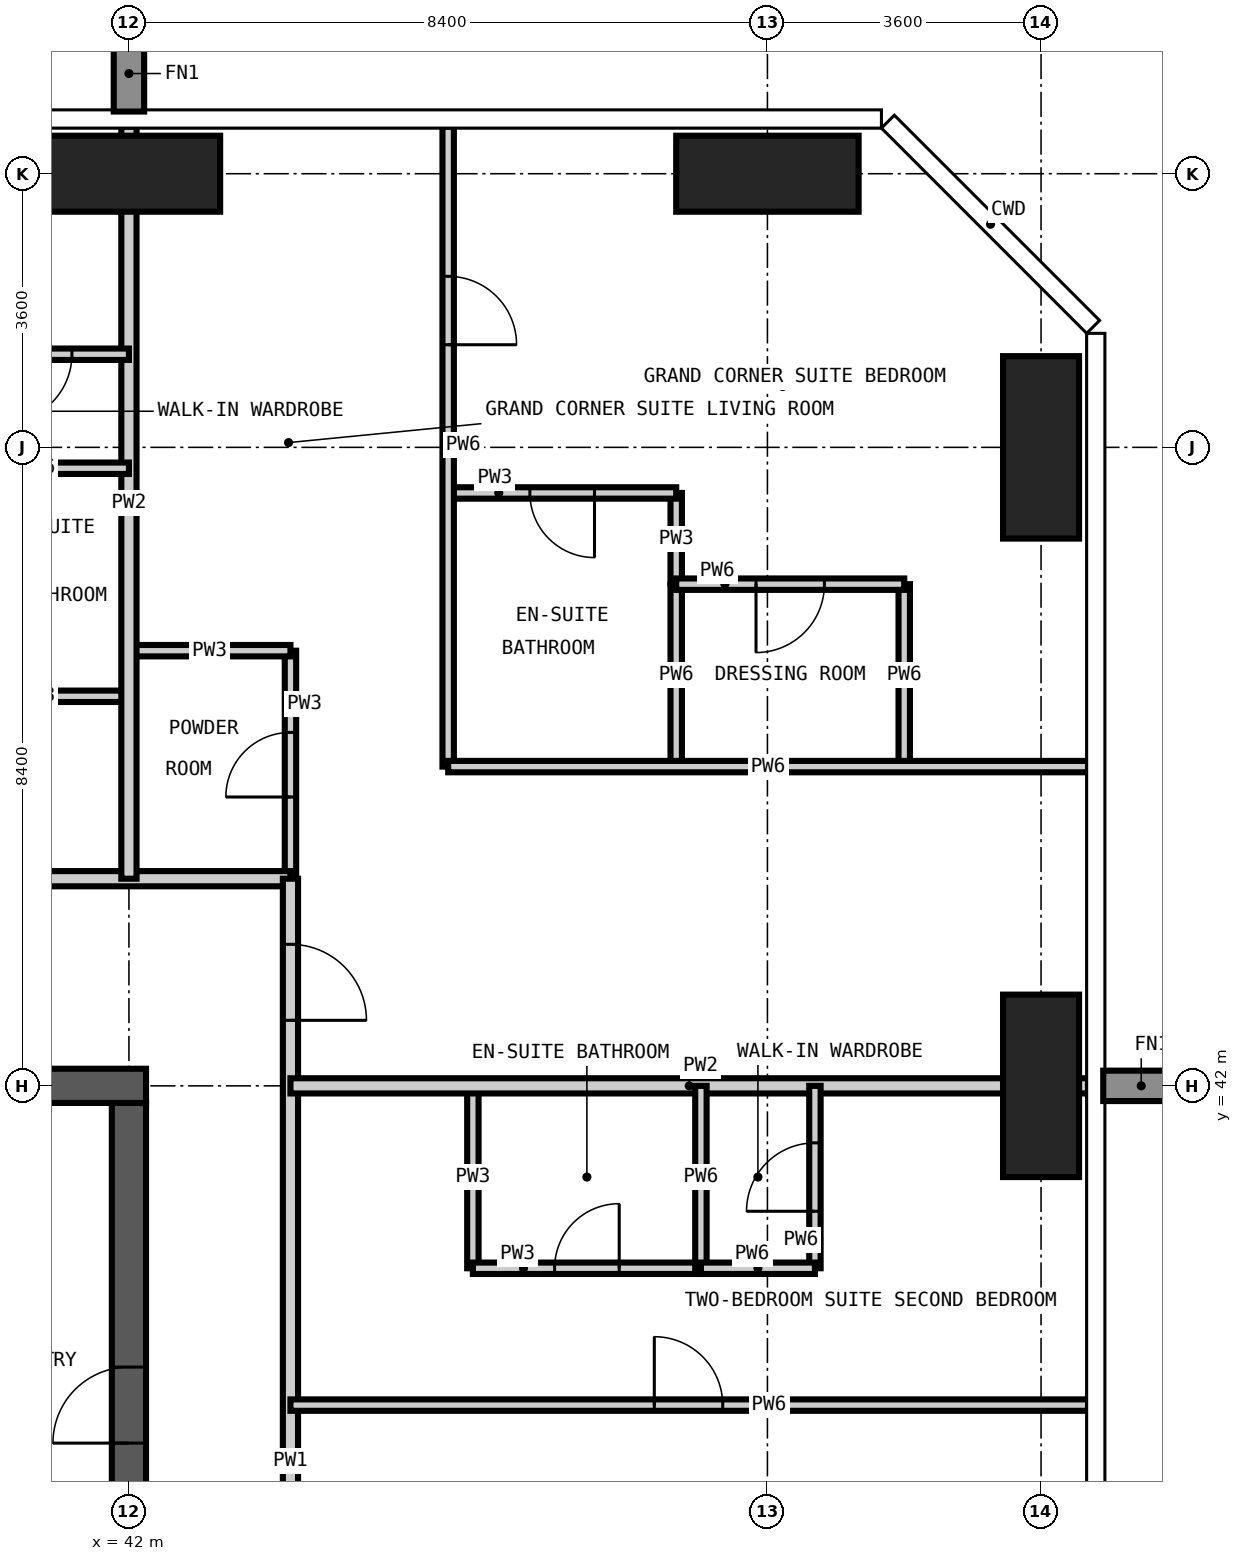
"""IFC4 building model, lengths in metres.
Left out: names, types, materials, properties, quantities, classifications, styles, units other than length and angle.
Written with IfcOpenShell. Run it as: python <this file> out.ifc"""

import sys

from ifc_helpers import new_model, si_unit, direction, frame, frame_2d, origin, origin_2d, place, context, subcontext, project, spatial, rectangle, extrude, element, fill, save


model = new_model("IFC4")
c1 = context("Model", 3, precision=1e-05, world=origin(), true_north=direction((0.0, 1.0)))
c2 = subcontext(c1, "Body", "Model", "MODEL_VIEW")
j1 = project(units=[si_unit("LENGTHUNIT", "METRE"), si_unit("PLANEANGLEUNIT", "RADIAN")], contexts=[c1])
p1 = place(None, origin())
s1 = spatial("IfcSite", under=j1, at=p1, CompositionType="ELEMENT")
p2 = place(p1, origin())
s2 = spatial("IfcBuilding", under=s1, at=p2, CompositionType="ELEMENT")
p3 = place(p2, frame((0.0, 0.0, 276.3)))
s3 = spatial("IfcBuildingStorey", under=s2, at=p3, CompositionType="ELEMENT", Elevation=276.3)
for number, where, z_axis, x_axis in (
    (1, (42.0, 54.0, -0.35), (0.0, 0.0, 1.0), (1.0, 0.0, 0.0)),
    (2, (50.4, 54.0, -0.35), (0.0, 0.0, 1.0), (1.0, 0.0, 0.0)),
):
    element("IfcColumn", number, at=place(p3, frame(where, z_axis=z_axis, x_axis=x_axis)), inside=s3, PredefinedType="COLUMN", context=c2, shape_type="SweptSolid", body=[
        extrude(rectangle(XDim=2.4, YDim=1.0, at=origin_2d()), origin(), (0.0, 0.0, 1.0), 3.9),
    ])
for number, where, z_axis, x_axis in (
    (3, (54.0, 42.0, -0.35), (0.0, 0.0, 1.0), (1.0, 0.0, 0.0)),
    (4, (54.0, 50.4, -0.35), (0.0, 0.0, 1.0), (1.0, 0.0, 0.0)),
):
    element("IfcColumn", number, at=place(p3, frame(where, z_axis=z_axis, x_axis=x_axis)), inside=s3, PredefinedType="COLUMN", context=c2, shape_type="SweptSolid", body=[
        extrude(rectangle(XDim=1.0, YDim=2.4, at=origin_2d()), origin(), (0.0, 0.0, 1.0), 3.9),
    ])
p4 = place(p3, frame((42.0, 17.025, -0.35), z_axis=(0.0, 0.0, 1.0), x_axis=(0.0, 1.0, 0.0)))
e5 = element("IfcWall", 5, at=p4, inside=s3, PredefinedType="SHEAR", context=c2, shape_type="SweptSolid", body=[
    extrude(rectangle(XDim=24.75, YDim=0.45, at=frame_2d((12.375, 0.0))), origin(), (0.0, 0.0, 1.0), 3.9),
])
p5 = place(p4, frame((0.575, 0.0, 0.35)))
e6 = element("IfcOpeningElement", 6, at=p5, cuts=e5, PredefinedType="OPENING", context=c2, shape_type="SweptSolid", body=[
    extrude(rectangle(XDim=1.2, YDim=2.2, at=frame_2d((0.6, 1.1))), frame((0.0, 0.235, 0.0), z_axis=(0.0, -1.0, 0.0), x_axis=(1.0, 0.0, 0.0)), (0.0, 0.0, 1.0), 0.47),
])
p6 = place(p4, frame((11.475, 0.0, 0.35)))
e7 = element("IfcOpeningElement", 7, at=p6, cuts=e5, PredefinedType="OPENING", context=c2, shape_type="SweptSolid", body=[
    extrude(rectangle(XDim=1.8, YDim=2.2, at=frame_2d((0.9, 1.1))), frame((0.0, 0.235, 0.0), z_axis=(0.0, -1.0, 0.0), x_axis=(1.0, 0.0, 0.0)), (0.0, 0.0, 1.0), 0.47),
])
p7 = place(p4, frame((20.275, 0.0, 0.35)))
e8 = element("IfcOpeningElement", 8, at=p7, cuts=e5, PredefinedType="OPENING", context=c2, shape_type="SweptSolid", body=[
    extrude(rectangle(XDim=1.0, YDim=2.1, at=frame_2d((0.5, 1.05))), frame((0.0, 0.235, 0.0), z_axis=(0.0, -1.0, 0.0), x_axis=(1.0, 0.0, 0.0)), (0.0, 0.0, 1.0), 0.47),
])
p8 = place(p3, frame((42.225, 42.0, -0.35), z_axis=(0.0, 0.0, 1.0), x_axis=(-1.0, 0.0, 0.0)))
e9 = element("IfcWall", 9, at=p8, inside=s3, PredefinedType="SHEAR", context=c2, shape_type="SweptSolid", body=[
    extrude(rectangle(XDim=17.25, YDim=0.45, at=frame_2d((8.625, 0.0))), origin(), (0.0, 0.0, 1.0), 3.9),
])
p9 = place(p8, frame((10.125, 0.0, 0.35)))
e10 = element("IfcOpeningElement", 10, at=p9, cuts=e9, PredefinedType="OPENING", context=c2, shape_type="SweptSolid", body=[
    extrude(rectangle(XDim=1.2, YDim=2.2, at=frame_2d((0.6, 1.1))), frame((0.0, 0.235, 0.0), z_axis=(0.0, -1.0, 0.0), x_axis=(1.0, 0.0, 0.0)), (0.0, 0.0, 1.0), 0.47),
])
p10 = place(p3, frame((44.125, 44.725, 0.0), z_axis=(0.0, 0.0, 1.0), x_axis=(0.0, 1.0, 0.0)))
e11 = element("IfcWall", 11, at=p10, inside=s3, PredefinedType="PARTITIONING", context=c2, shape_type="SweptSolid", body=[
    extrude(rectangle(XDim=3.0, YDim=0.15, at=frame_2d((1.5, 0.0))), origin(), (0.0, 0.0, 1.0), 3.55),
])
p11 = place(p10, frame((1.075, 0.0, 0.0)))
e12 = element("IfcOpeningElement", 12, at=p11, cuts=e11, PredefinedType="OPENING", context=c2, shape_type="SweptSolid", body=[
    extrude(rectangle(XDim=0.85, YDim=2.1, at=frame_2d((0.425, 1.05))), frame((0.0, 0.085, 0.0), z_axis=(0.0, -1.0, 0.0), x_axis=(1.0, 0.0, 0.0)), (0.0, 0.0, 1.0), 0.17),
])
p12 = place(p3, frame((46.525, 39.6, 0.0), z_axis=(0.0, 0.0, 1.0), x_axis=(0.0, 1.0, 0.0)))
e13 = element("IfcWall", 13, at=p12, inside=s3, PredefinedType="PARTITIONING", context=c2, shape_type="SweptSolid", body=[
    extrude(rectangle(XDim=2.4, YDim=0.15, at=frame_2d((1.2, 0.0))), origin(), (0.0, 0.0, 1.0), 3.55),
])
p13 = place(p3, frame((49.2, 48.6, 0.0), z_axis=(0.0, 0.0, 1.0), x_axis=(0.0, 1.0, 0.0)))
e14 = element("IfcWall", 14, at=p13, inside=s3, PredefinedType="PARTITIONING", context=c2, shape_type="SweptSolid", body=[
    extrude(rectangle(XDim=1.2, YDim=0.15, at=frame_2d((0.6, 0.0))), origin(), (0.0, 0.0, 1.0), 3.55),
])
p14 = place(p3, frame((46.525, 39.6, 0.0), z_axis=(0.0, 0.0, 1.0), x_axis=(1.0, 0.0, 0.0)))
e15 = element("IfcWall", 15, at=p14, inside=s3, PredefinedType="PARTITIONING", context=c2, shape_type="SweptSolid", body=[
    extrude(rectangle(XDim=3.0, YDim=0.15, at=frame_2d((1.5, 0.0))), origin(), (0.0, 0.0, 1.0), 3.55),
])
p15 = place(p14, frame((1.075, 0.0, 0.0)))
e16 = element("IfcOpeningElement", 16, at=p15, cuts=e15, PredefinedType="OPENING", context=c2, shape_type="SweptSolid", body=[
    extrude(rectangle(XDim=0.85, YDim=2.1, at=frame_2d((0.425, 1.05))), frame((0.0, 0.085, 0.0), z_axis=(0.0, -1.0, 0.0), x_axis=(1.0, 0.0, 0.0)), (0.0, 0.0, 1.0), 0.17),
])
p16 = place(p3, frame((39.6, 47.125, 0.0), z_axis=(0.0, 0.0, 1.0), x_axis=(1.0, 0.0, 0.0)))
e17 = element("IfcWall", 17, at=p16, inside=s3, PredefinedType="PARTITIONING", context=c2, shape_type="SweptSolid", body=[
    extrude(rectangle(XDim=2.4, YDim=0.15, at=frame_2d((1.2, 0.0))), origin(), (0.0, 0.0, 1.0), 3.55),
])
p17 = place(p3, frame((42.0, 47.725, 0.0), z_axis=(0.0, 0.0, 1.0), x_axis=(1.0, 0.0, 0.0)))
e18 = element("IfcWall", 18, at=p17, inside=s3, PredefinedType="PARTITIONING", context=c2, shape_type="SweptSolid", body=[
    extrude(rectangle(XDim=2.125, YDim=0.15, at=frame_2d((1.062, 0.0))), origin(), (0.0, 0.0, 1.0), 3.55),
])
p18 = place(p3, frame((46.2, 49.8, 0.0), z_axis=(0.0, 0.0, 1.0), x_axis=(1.0, 0.0, 0.0)))
e19 = element("IfcWall", 19, at=p18, inside=s3, PredefinedType="PARTITIONING", context=c2, shape_type="SweptSolid", body=[
    extrude(rectangle(XDim=3.0, YDim=0.15, at=frame_2d((1.5, 0.0))), origin(), (0.0, 0.0, 1.0), 3.55),
])
p19 = place(p18, frame((1.075, 0.0, 0.0)))
e20 = element("IfcOpeningElement", 20, at=p19, cuts=e19, PredefinedType="OPENING", context=c2, shape_type="SweptSolid", body=[
    extrude(rectangle(XDim=0.85, YDim=2.1, at=frame_2d((0.425, 1.05))), frame((0.0, 0.085, 0.0), z_axis=(0.0, -1.0, 0.0), x_axis=(1.0, 0.0, 0.0)), (0.0, 0.0, 1.0), 0.17),
])
p20 = place(p3, frame((21.875, 44.725, 0.0), z_axis=(0.0, 0.0, 1.0), x_axis=(1.0, 0.0, 0.0)))
e21 = element("IfcWall", 21, at=p20, inside=s3, PredefinedType="PARTITIONING", context=c2, shape_type="SweptSolid", body=[
    extrude(rectangle(XDim=22.25, YDim=0.2, at=frame_2d((11.125, 0.0))), origin(), (0.0, 0.0, 1.0), 3.55),
])
p21 = place(p20, frame((10.025, 0.0, 0.0)))
e22 = element("IfcOpeningElement", 22, at=p21, cuts=e21, PredefinedType="OPENING", context=c2, shape_type="SweptSolid", body=[
    extrude(rectangle(XDim=1.0, YDim=2.2, at=frame_2d((0.5, 1.1))), frame((0.0, 0.11, 0.0), z_axis=(0.0, -1.0, 0.0), x_axis=(1.0, 0.0, 0.0)), (0.0, 0.0, 1.0), 0.22),
])
p22 = place(p3, frame((44.125, 44.725, 0.0), z_axis=(0.0, 0.0, 1.0), x_axis=(0.0, -1.0, 0.0)))
e23 = element("IfcWall", 23, at=p22, inside=s3, PredefinedType="PARTITIONING", context=c2, shape_type="SweptSolid", body=[
    extrude(rectangle(XDim=15.325, YDim=0.2, at=frame_2d((7.663, 0.0))), origin(), (0.0, 0.0, 1.0), 3.55),
])
p23 = place(p22, frame((8.525, 0.0, 0.0)))
e24 = element("IfcOpeningElement", 24, at=p23, cuts=e23, PredefinedType="OPENING", context=c2, shape_type="SweptSolid", body=[
    extrude(rectangle(XDim=1.0, YDim=2.2, at=frame_2d((0.5, 1.1))), frame((0.0, 0.11, 0.0), z_axis=(0.0, -1.0, 0.0), x_axis=(1.0, 0.0, 0.0)), (0.0, 0.0, 1.0), 0.22),
])
p24 = place(p22, frame((0.863, 0.0, 0.0)))
e25 = element("IfcOpeningElement", 25, at=p24, cuts=e23, PredefinedType="OPENING", context=c2, shape_type="SweptSolid", body=[
    extrude(rectangle(XDim=1.0, YDim=2.2, at=frame_2d((0.5, 1.1))), frame((0.0, 0.11, 0.0), z_axis=(0.0, -1.0, 0.0), x_axis=(1.0, 0.0, 0.0)), (0.0, 0.0, 1.0), 0.22),
])
p25 = place(p3, frame((42.0, 44.725, 0.0), z_axis=(0.0, 0.0, 1.0), x_axis=(0.0, 1.0, 0.0)))
e26 = element("IfcWall", 26, at=p25, inside=s3, PredefinedType="PARTITIONING", context=c2, shape_type="SweptSolid", body=[
    extrude(rectangle(XDim=9.893, YDim=0.2, at=frame_2d((4.946, 0.0))), origin(), (0.0, 0.0, 1.0), 3.55),
])
p26 = place(p3, frame((44.125, 42.0, 0.0), z_axis=(0.0, 0.0, 1.0), x_axis=(1.0, 0.0, 0.0)))
e27 = element("IfcWall", 27, at=p26, inside=s3, PredefinedType="PARTITIONING", context=c2, shape_type="SweptSolid", body=[
    extrude(rectangle(XDim=10.493, YDim=0.2, at=frame_2d((5.247, 0.0))), origin(), (0.0, 0.0, 1.0), 3.55),
])
p27 = place(p3, frame((46.2, 46.2, 0.0), z_axis=(0.0, 0.0, 1.0), x_axis=(0.0, 1.0, 0.0)))
e28 = element("IfcWall", 28, at=p27, inside=s3, PredefinedType="PARTITIONING", context=c2, shape_type="SweptSolid", body=[
    extrude(rectangle(XDim=8.418, YDim=0.15, at=frame_2d((4.209, 0.0))), origin(), (0.0, 0.0, 1.0), 3.55),
])
p28 = place(p27, frame((5.55, 0.0, 0.0)))
e29 = element("IfcOpeningElement", 29, at=p28, cuts=e28, PredefinedType="OPENING", context=c2, shape_type="SweptSolid", body=[
    extrude(rectangle(XDim=0.9, YDim=2.1, at=frame_2d((0.45, 1.05))), frame((0.0, 0.085, 0.0), z_axis=(0.0, -1.0, 0.0), x_axis=(1.0, 0.0, 0.0)), (0.0, 0.0, 1.0), 0.17),
])
p29 = place(p3, frame((49.2, 46.2, 0.0), z_axis=(0.0, 0.0, 1.0), x_axis=(0.0, 1.0, 0.0)))
e30 = element("IfcWall", 30, at=p29, inside=s3, PredefinedType="PARTITIONING", context=c2, shape_type="SweptSolid", body=[
    extrude(rectangle(XDim=2.4, YDim=0.15, at=frame_2d((1.2, 0.0))), origin(), (0.0, 0.0, 1.0), 3.55),
])
p30 = place(p3, frame((49.525, 39.6, 0.0), z_axis=(0.0, 0.0, 1.0), x_axis=(0.0, 1.0, 0.0)))
e31 = element("IfcWall", 31, at=p30, inside=s3, PredefinedType="PARTITIONING", context=c2, shape_type="SweptSolid", body=[
    extrude(rectangle(XDim=2.4, YDim=0.15, at=frame_2d((1.2, 0.0))), origin(), (0.0, 0.0, 1.0), 3.55),
])
p31 = place(p3, frame((51.025, 39.6, 0.0), z_axis=(0.0, 0.0, 1.0), x_axis=(0.0, 1.0, 0.0)))
e32 = element("IfcWall", 32, at=p31, inside=s3, PredefinedType="PARTITIONING", context=c2, shape_type="SweptSolid", body=[
    extrude(rectangle(XDim=2.4, YDim=0.15, at=frame_2d((1.2, 0.0))), origin(), (0.0, 0.0, 1.0), 3.55),
])
p32 = place(p31, frame((0.75, 0.0, 0.0)))
e33 = element("IfcOpeningElement", 33, at=p32, cuts=e32, PredefinedType="OPENING", context=c2, shape_type="SweptSolid", body=[
    extrude(rectangle(XDim=0.9, YDim=2.1, at=frame_2d((0.45, 1.05))), frame((0.0, 0.085, 0.0), z_axis=(0.0, -1.0, 0.0), x_axis=(1.0, 0.0, 0.0)), (0.0, 0.0, 1.0), 0.17),
])
p33 = place(p3, frame((52.2, 46.2, 0.0), z_axis=(0.0, 0.0, 1.0), x_axis=(0.0, 1.0, 0.0)))
e34 = element("IfcWall", 34, at=p33, inside=s3, PredefinedType="PARTITIONING", context=c2, shape_type="SweptSolid", body=[
    extrude(rectangle(XDim=2.4, YDim=0.15, at=frame_2d((1.2, 0.0))), origin(), (0.0, 0.0, 1.0), 3.55),
])
p34 = place(p3, frame((44.125, 37.8, 0.0), z_axis=(0.0, 0.0, 1.0), x_axis=(1.0, 0.0, 0.0)))
e35 = element("IfcWall", 35, at=p34, inside=s3, PredefinedType="PARTITIONING", context=c2, shape_type="SweptSolid", body=[
    extrude(rectangle(XDim=10.493, YDim=0.15, at=frame_2d((5.247, 0.0))), origin(), (0.0, 0.0, 1.0), 3.55),
])
p35 = place(p34, frame((4.787, 0.0, 0.0)))
e36 = element("IfcOpeningElement", 36, at=p35, cuts=e35, PredefinedType="OPENING", context=c2, shape_type="SweptSolid", body=[
    extrude(rectangle(XDim=0.9, YDim=2.1, at=frame_2d((0.45, 1.05))), frame((0.0, 0.085, 0.0), z_axis=(0.0, -1.0, 0.0), x_axis=(1.0, 0.0, 0.0)), (0.0, 0.0, 1.0), 0.17),
])
p36 = place(p3, frame((49.525, 39.6, 0.0), z_axis=(0.0, 0.0, 1.0), x_axis=(1.0, 0.0, 0.0)))
e37 = element("IfcWall", 37, at=p36, inside=s3, PredefinedType="PARTITIONING", context=c2, shape_type="SweptSolid", body=[
    extrude(rectangle(XDim=1.5, YDim=0.15, at=frame_2d((0.75, 0.0))), origin(), (0.0, 0.0, 1.0), 3.55),
])
p37 = place(p3, frame((46.2, 46.2, 0.0), z_axis=(0.0, 0.0, 1.0), x_axis=(1.0, 0.0, 0.0)))
e38 = element("IfcWall", 38, at=p37, inside=s3, PredefinedType="PARTITIONING", context=c2, shape_type="SweptSolid", body=[
    extrude(rectangle(XDim=8.418, YDim=0.15, at=frame_2d((4.209, 0.0))), origin(), (0.0, 0.0, 1.0), 3.55),
])
p38 = place(p3, frame((49.2, 48.6, 0.0), z_axis=(0.0, 0.0, 1.0), x_axis=(1.0, 0.0, 0.0)))
e39 = element("IfcWall", 39, at=p38, inside=s3, PredefinedType="PARTITIONING", context=c2, shape_type="SweptSolid", body=[
    extrude(rectangle(XDim=3.0, YDim=0.15, at=frame_2d((1.5, 0.0))), origin(), (0.0, 0.0, 1.0), 3.55),
])
p39 = place(p38, frame((1.05, 0.0, 0.0)))
e40 = element("IfcOpeningElement", 40, at=p39, cuts=e39, PredefinedType="OPENING", context=c2, shape_type="SweptSolid", body=[
    extrude(rectangle(XDim=0.9, YDim=2.1, at=frame_2d((0.45, 1.05))), frame((0.0, 0.085, 0.0), z_axis=(0.0, -1.0, 0.0), x_axis=(1.0, 0.0, 0.0)), (0.0, 0.0, 1.0), 0.17),
])
p40 = place(p3, frame((39.6, 50.125, 0.0), z_axis=(0.0, 0.0, 1.0), x_axis=(1.0, 0.0, 0.0)))
e41 = element("IfcWall", 41, at=p40, inside=s3, PredefinedType="PARTITIONING", context=c2, shape_type="SweptSolid", body=[
    extrude(rectangle(XDim=2.4, YDim=0.15, at=frame_2d((1.2, 0.0))), origin(), (0.0, 0.0, 1.0), 3.55),
])
p41 = place(p3, frame((39.6, 51.625, 0.0), z_axis=(0.0, 0.0, 1.0), x_axis=(1.0, 0.0, 0.0)))
e42 = element("IfcWall", 42, at=p41, inside=s3, PredefinedType="PARTITIONING", context=c2, shape_type="SweptSolid", body=[
    extrude(rectangle(XDim=2.4, YDim=0.15, at=frame_2d((1.2, 0.0))), origin(), (0.0, 0.0, 1.0), 3.55),
])
p42 = place(p41, frame((0.75, 0.0, 0.0)))
e43 = element("IfcOpeningElement", 43, at=p42, cuts=e42, PredefinedType="OPENING", context=c2, shape_type="SweptSolid", body=[
    extrude(rectangle(XDim=0.9, YDim=2.1, at=frame_2d((0.45, 1.05))), frame((0.0, 0.085, 0.0), z_axis=(0.0, -1.0, 0.0), x_axis=(1.0, 0.0, 0.0)), (0.0, 0.0, 1.0), 0.17),
])
p43 = place(p35, origin())
e44 = element("IfcDoor", 44, at=p43, inside=s3, OperationType="SINGLE_SWING_LEFT", PredefinedType="DOOR", context=c2, shape_type="SweptSolid", body=[
    extrude(rectangle(XDim=0.9, YDim=2.1, at=frame_2d((0.45, 1.05))), frame((0.0, 0.025, 0.0), z_axis=(0.0, -1.0, 0.0), x_axis=(1.0, 0.0, 0.0)), (0.0, 0.0, 1.0), 0.05),
])
fill(e36, e44)
p44 = place(p15, origin())
e45 = element("IfcDoor", 45, at=p44, inside=s3, OperationType="SINGLE_SWING_RIGHT", PredefinedType="DOOR", context=c2, shape_type="SweptSolid", body=[
    extrude(rectangle(XDim=0.85, YDim=2.1, at=frame_2d((0.425, 1.05))), frame((0.0, 0.025, 0.0), z_axis=(0.0, -1.0, 0.0), x_axis=(1.0, 0.0, 0.0)), (0.0, 0.0, 1.0), 0.05),
])
fill(e16, e45)
p45 = place(p32, origin())
e46 = element("IfcDoor", 46, at=p45, inside=s3, OperationType="SINGLE_SWING_LEFT", PredefinedType="DOOR", context=c2, shape_type="SweptSolid", body=[
    extrude(rectangle(XDim=0.9, YDim=2.1, at=frame_2d((0.45, 1.05))), frame((0.0, 0.025, 0.0), z_axis=(0.0, -1.0, 0.0), x_axis=(1.0, 0.0, 0.0)), (0.0, 0.0, 1.0), 0.05),
])
fill(e33, e46)
p46 = place(p42, frame((0.9, 0.0, 0.0), z_axis=(0.0, 0.0, 1.0), x_axis=(-1.0, 0.0, 0.0)))
e47 = element("IfcDoor", 47, at=p46, inside=s3, OperationType="SINGLE_SWING_RIGHT", PredefinedType="DOOR", context=c2, shape_type="SweptSolid", body=[
    extrude(rectangle(XDim=0.9, YDim=2.1, at=frame_2d((0.45, 1.05))), frame((0.0, 0.025, 0.0), z_axis=(0.0, -1.0, 0.0), x_axis=(1.0, 0.0, 0.0)), (0.0, 0.0, 1.0), 0.05),
])
fill(e43, e47)
p47 = place(p24, origin())
e48 = element("IfcDoor", 48, at=p47, inside=s3, OperationType="SINGLE_SWING_RIGHT", PredefinedType="DOOR", context=c2, shape_type="SweptSolid", body=[
    extrude(rectangle(XDim=1.0, YDim=2.2, at=frame_2d((0.5, 1.1))), frame((0.0, 0.025, 0.0), z_axis=(0.0, -1.0, 0.0), x_axis=(1.0, 0.0, 0.0)), (0.0, 0.0, 1.0), 0.05),
])
fill(e25, e48)
p48 = place(p11, origin())
e49 = element("IfcDoor", 49, at=p48, inside=s3, OperationType="SINGLE_SWING_LEFT", PredefinedType="DOOR", context=c2, shape_type="SweptSolid", body=[
    extrude(rectangle(XDim=0.85, YDim=2.1, at=frame_2d((0.425, 1.05))), frame((0.0, 0.025, 0.0), z_axis=(0.0, -1.0, 0.0), x_axis=(1.0, 0.0, 0.0)), (0.0, 0.0, 1.0), 0.05),
])
fill(e12, e49)
p49 = place(p28, frame((0.9, 0.0, 0.0), z_axis=(0.0, 0.0, 1.0), x_axis=(-1.0, 0.0, 0.0)))
e50 = element("IfcDoor", 50, at=p49, inside=s3, OperationType="SINGLE_SWING_RIGHT", PredefinedType="DOOR", context=c2, shape_type="SweptSolid", body=[
    extrude(rectangle(XDim=0.9, YDim=2.1, at=frame_2d((0.45, 1.05))), frame((0.0, 0.025, 0.0), z_axis=(0.0, -1.0, 0.0), x_axis=(1.0, 0.0, 0.0)), (0.0, 0.0, 1.0), 0.05),
])
fill(e29, e50)
p50 = place(p19, frame((0.85, 0.0, 0.0), z_axis=(0.0, 0.0, 1.0), x_axis=(-1.0, 0.0, 0.0)))
e51 = element("IfcDoor", 51, at=p50, inside=s3, OperationType="SINGLE_SWING_LEFT", PredefinedType="DOOR", context=c2, shape_type="SweptSolid", body=[
    extrude(rectangle(XDim=0.85, YDim=2.1, at=frame_2d((0.425, 1.05))), frame((0.0, 0.025, 0.0), z_axis=(0.0, -1.0, 0.0), x_axis=(1.0, 0.0, 0.0)), (0.0, 0.0, 1.0), 0.05),
])
fill(e20, e51)
p51 = place(p39, frame((0.9, 0.0, 0.0), z_axis=(0.0, 0.0, 1.0), x_axis=(-1.0, 0.0, 0.0)))
e52 = element("IfcDoor", 52, at=p51, inside=s3, OperationType="SINGLE_SWING_RIGHT", PredefinedType="DOOR", context=c2, shape_type="SweptSolid", body=[
    extrude(rectangle(XDim=0.9, YDim=2.1, at=frame_2d((0.45, 1.05))), frame((0.0, 0.025, 0.0), z_axis=(0.0, -1.0, 0.0), x_axis=(1.0, 0.0, 0.0)), (0.0, 0.0, 1.0), 0.05),
])
fill(e40, e52)
p52 = place(p7, origin())
e53 = element("IfcDoor", 53, at=p52, inside=s3, OperationType="SINGLE_SWING_LEFT", PredefinedType="DOOR", context=c2, shape_type="SweptSolid", body=[
    extrude(rectangle(XDim=1.0, YDim=2.1, at=frame_2d((0.5, 1.05))), frame((0.0, 0.025, 0.0), z_axis=(0.0, -1.0, 0.0), x_axis=(1.0, 0.0, 0.0)), (0.0, 0.0, 1.0), 0.05),
])
fill(e8, e53)
save(model, sys.argv[1])
